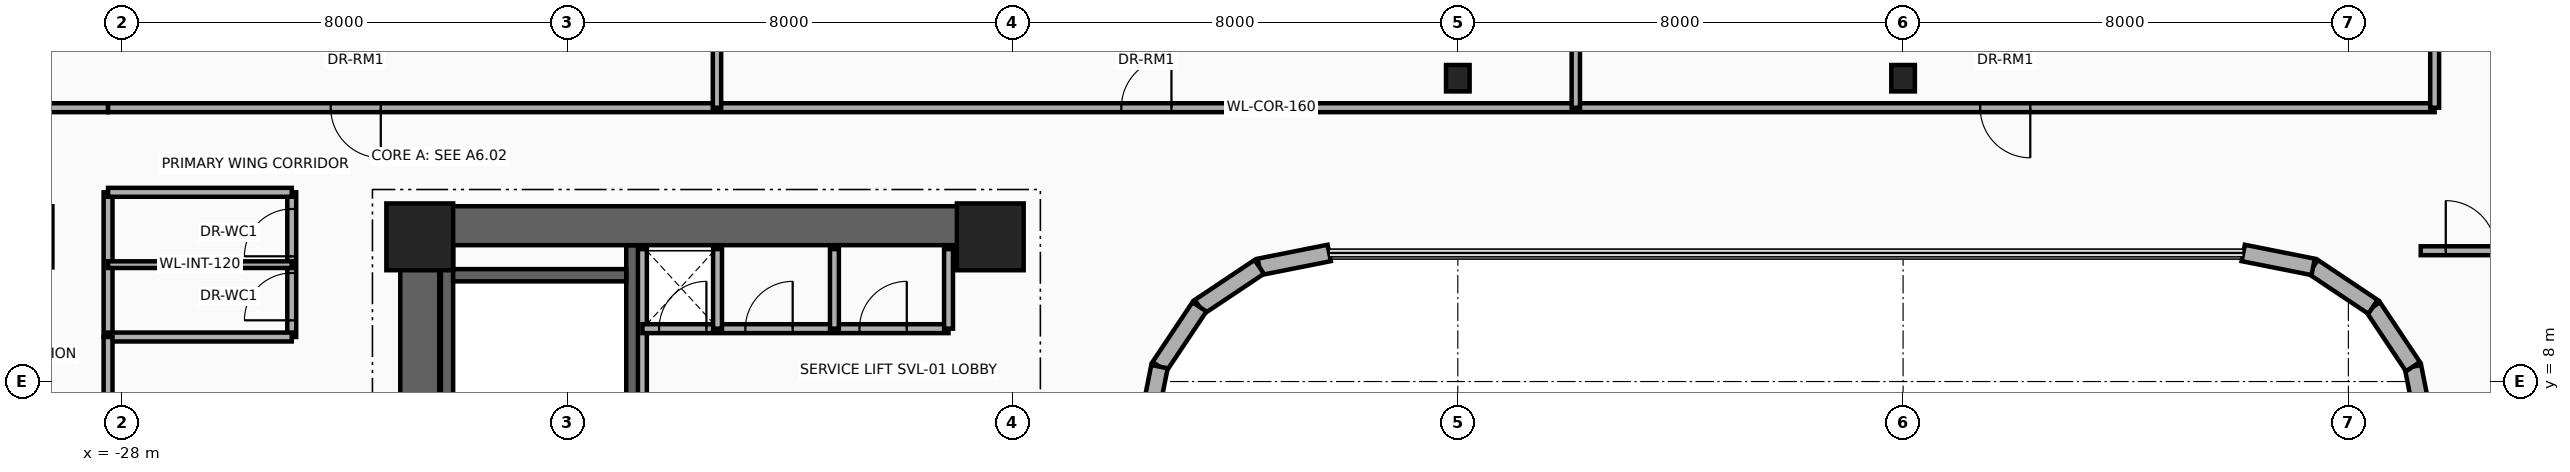
"""IFC4 building model, lengths in metres.
Left out: names, types, materials, properties, quantities, classifications, styles, units other than length and angle.
Written with IfcOpenShell. Run it as: python <this file> out.ifc"""

import sys

from ifc_helpers import new_model, si_unit, direction, frame, frame_2d, origin, origin_2d, place, context, subcontext, project, spatial, rectangle, i_section, extrude, source, transform, mapped, element, fill, save


model = new_model("IFC4")
c1 = context("Model", 3, precision=1e-05, world=origin(), true_north=direction((0.0, 1.0)))
c2 = subcontext(c1, "Body", "Model", "MODEL_VIEW")
j1 = project(units=[si_unit("LENGTHUNIT", "METRE"), si_unit("PLANEANGLEUNIT", "RADIAN")], contexts=[c1])
p1 = place(None, origin())
s1 = spatial("IfcSite", under=j1, at=p1, CompositionType="ELEMENT")
p2 = place(p1, origin())
s2 = spatial("IfcBuilding", under=s1, at=p2, CompositionType="ELEMENT")
p3 = place(p2, frame((0.0, 0.0, 146.4)))
s3 = spatial("IfcBuildingStorey", under=s2, at=p3, CompositionType="ELEMENT", Elevation=146.4)
for number, where, z_axis, x_axis in (
    (1, (-22.16, 1.78, 0.0), (0.0, 0.0, 1.0), (0.0, 1.0, 0.0)),
    (2, (-18.83, 1.78, 0.0), (0.0, 0.0, 1.0), (0.0, 1.0, 0.0)),
):
    element("IfcWall", number, at=place(p3, frame(where, z_axis=z_axis, x_axis=x_axis)), inside=s3, PredefinedType="SHEAR", context=c2, shape_type="SweptSolid", body=[
        extrude(rectangle(XDim=8.67, YDim=0.22, at=frame_2d((4.335, 0.0))), origin(), (0.0, 0.0, 1.0), 3.46),
    ])
p4 = place(p3, frame((-22.05, 9.91, 0.0), z_axis=(0.0, 0.0, 1.0), x_axis=(1.0, 0.0, 0.0)))
e3 = element("IfcWall", 3, at=p4, inside=s3, PredefinedType="SHEAR", context=c2, shape_type="SweptSolid", body=[
    extrude(rectangle(XDim=3.11, YDim=0.22, at=frame_2d((1.555, 0.0))), origin(), (0.0, 0.0, 1.0), 3.46),
])
p5 = place(p3, frame((-22.65, -11.15, 0.0), z_axis=(0.0, 0.0, 1.0), x_axis=(0.0, 1.0, 0.0)))
e4 = element("IfcWall", 4, at=p5, inside=s3, PredefinedType="SHEAR", context=c2, shape_type="SweptSolid", body=[
    extrude(rectangle(XDim=22.3, YDim=0.7, at=frame_2d((11.15, 0.0))), origin(), (0.0, 0.0, 1.0), 3.46),
])
p6 = place(p3, frame((-22.65, 10.8, 0.0), z_axis=(0.0, 0.0, 1.0), x_axis=(1.0, 0.0, 0.0)))
e5 = element("IfcWall", 5, at=p6, inside=s3, PredefinedType="SHEAR", context=c2, shape_type="SweptSolid", body=[
    extrude(rectangle(XDim=10.25, YDim=0.7, at=frame_2d((5.125, 0.0))), origin(), (0.0, 0.0, 1.0), 3.46),
])
m1 = source(origin(), c2, "Body", "SweptSolid", [
    extrude(rectangle(XDim=1.2, YDim=1.2, at=origin_2d()), origin(), (0.0, 0.0, 1.0), 3.7),
])
for number, where, z_axis, x_axis in (
    (6, (-22.65, 10.6, 0.0), (0.0, 0.0, 1.0), (1.0, 0.0, 0.0)),
    (7, (-12.4, 10.6, 0.0), (0.0, 0.0, 1.0), (1.0, 0.0, 0.0)),
):
    element("IfcColumn", number, at=place(p3, frame(where, z_axis=z_axis, x_axis=x_axis)), inside=s3, PredefinedType="COLUMN", context=c2, shape_type="MappedRepresentation", body=[
        mapped(m1, transform((0.0, 0.0, 0.0), x_axis=(1.0, 0.0, 0.0), y_axis=(0.0, 1.0, 0.0), z_axis=(0.0, 0.0, 1.0), scale=1.0)),
    ])
m2 = source(origin(), c2, "Body", "SweptSolid", [
    extrude(i_section(OverallWidth=0.424, OverallDepth=0.474, WebThickness=0.048, FlangeThickness=0.077, at=origin_2d()), origin(), (0.0, 0.0, 1.0), 3.7),
])
for number, where, z_axis, x_axis in (
    (8, (-4.0, 13.45, 0.0), (0.0, 0.0, 1.0), (1.0, 0.0, 0.0)),
    (9, (4.0, 13.45, 0.0), (0.0, 0.0, 1.0), (1.0, 0.0, 0.0)),
):
    element("IfcColumn", number, at=place(p3, frame(where, z_axis=z_axis, x_axis=x_axis)), inside=s3, PredefinedType="COLUMN", context=c2, shape_type="MappedRepresentation", body=[
        mapped(m2, transform((0.0, 0.0, 0.0), x_axis=(1.0, 0.0, 0.0), y_axis=(0.0, 1.0, 0.0), z_axis=(0.0, 0.0, 1.0), scale=1.0)),
    ])
p7 = place(p3, frame((13.41, 7.011, 0.0), z_axis=(0.0, 0.0, 1.0), x_axis=(-0.195090163074, 0.980785312019, 0.0)))
e10 = element("IfcWall", 10, at=p7, inside=s3, PredefinedType="SOLIDWALL", context=c2, shape_type="SweptSolid", body=[
    extrude(rectangle(XDim=1.281, YDim=0.3, at=frame_2d((0.641, 0.0))), origin(), (0.0, 0.0, 1.0), 3.46),
])
for number, where, z_axis, x_axis in (
    (11, (13.16, 8.268, 0.0), (0.0, 0.0, 1.0), (-0.556, 0.831, 0.0)),
    (12, (12.442, 9.342, 0.0), (0.0, 0.0, 1.0), (-0.831, 0.556, 0.0)),
):
    element("IfcWall", number, at=place(p3, frame(where, z_axis=z_axis, x_axis=x_axis)), inside=s3, PredefinedType="SOLIDWALL", context=c2, shape_type="SweptSolid", body=[
        extrude(rectangle(XDim=1.292, YDim=0.3, at=frame_2d((0.646, 0.0))), origin(), (0.0, 0.0, 1.0), 3.46),
    ])
for number, where, z_axis, x_axis in (
    (13, (11.367, 10.06, 0.0), (0.0, 0.0, 1.0), (-0.981, 0.195, 0.0)),
    (14, (-6.311, 10.31, 0.0), (0.0, 0.0, 1.0), (-0.981, -0.195, 0.0)),
):
    element("IfcWall", number, at=place(p3, frame(where, z_axis=z_axis, x_axis=x_axis)), inside=s3, PredefinedType="SOLIDWALL", context=c2, shape_type="SweptSolid", body=[
        extrude(rectangle(XDim=1.281, YDim=0.3, at=frame_2d((0.641, 0.0))), origin(), (0.0, 0.0, 1.0), 3.46),
    ])
p8 = place(p3, frame((-7.567, 10.06, 0.0), z_axis=(0.0, 0.0, 1.0), x_axis=(-0.831497739511, -0.555528135371, 0.0)))
e15 = element("IfcWall", 15, at=p8, inside=s3, PredefinedType="SOLIDWALL", context=c2, shape_type="SweptSolid", body=[
    extrude(rectangle(XDim=1.292, YDim=0.3, at=frame_2d((0.646, 0.0))), origin(), (0.0, 0.0, 1.0), 3.46),
])
p9 = place(p3, frame((-8.642, 9.342, 0.0), z_axis=(0.0, 0.0, 1.0), x_axis=(-0.555615398575, -0.831439431869, 0.0)))
e16 = element("IfcWall", 16, at=p9, inside=s3, PredefinedType="SOLIDWALL", context=c2, shape_type="SweptSolid", body=[
    extrude(rectangle(XDim=1.292, YDim=0.3, at=frame_2d((0.646, 0.0))), origin(), (0.0, 0.0, 1.0), 3.46),
])
p10 = place(p3, frame((-9.36, 8.268, 0.0), z_axis=(0.0, 0.0, 1.0), x_axis=(-0.195090163074, -0.980785312019, 0.0)))
e17 = element("IfcWall", 17, at=p10, inside=s3, PredefinedType="SOLIDWALL", context=c2, shape_type="SweptSolid", body=[
    extrude(rectangle(XDim=1.281, YDim=0.3, at=frame_2d((0.641, 0.0))), origin(), (0.0, 0.0, 1.0), 3.46),
])
p11 = place(p3, frame((-18.65, 7.45, 0.0), z_axis=(0.0, 0.0, 1.0), x_axis=(0.0, 1.0, 0.0)))
e18 = element("IfcWall", 18, at=p11, inside=s3, PredefinedType="PARTITIONING", context=c2, shape_type="SweptSolid", body=[
    extrude(rectangle(XDim=2.93, YDim=0.16, at=frame_2d((1.465, 0.0))), origin(), (0.0, 0.0, 1.0), 3.46),
])
p12 = place(p3, frame((-18.65, 8.95, 0.0), z_axis=(0.0, 0.0, 1.0), x_axis=(1.0, 0.0, 0.0)))
e19 = element("IfcWall", 19, at=p12, inside=s3, PredefinedType="PARTITIONING", context=c2, shape_type="SweptSolid", body=[
    extrude(rectangle(XDim=5.5, YDim=0.16, at=frame_2d((2.75, 0.0))), origin(), (0.0, 0.0, 1.0), 3.46),
])
p13 = place(p12, frame((0.3, 0.0, 0.0)))
e20 = element("IfcOpeningElement", 20, at=p13, cuts=e19, PredefinedType="OPENING", context=c2, shape_type="SweptSolid", body=[
    extrude(rectangle(XDim=0.85, YDim=2.05, at=frame_2d((0.425, 1.025))), frame((0.0, 0.095, 0.0), z_axis=(0.0, -1.0, 0.0), x_axis=(1.0, 0.0, 0.0)), (0.0, 0.0, 1.0), 0.19),
])
p14 = place(p12, frame((1.85, 0.0, 0.0)))
e21 = element("IfcOpeningElement", 21, at=p14, cuts=e19, PredefinedType="OPENING", context=c2, shape_type="SweptSolid", body=[
    extrude(rectangle(XDim=0.85, YDim=2.05, at=frame_2d((0.425, 1.025))), frame((0.0, 0.095, 0.0), z_axis=(0.0, -1.0, 0.0), x_axis=(1.0, 0.0, 0.0)), (0.0, 0.0, 1.0), 0.19),
])
p15 = place(p12, frame((3.9, 0.0, 0.0)))
e22 = element("IfcOpeningElement", 22, at=p15, cuts=e19, PredefinedType="OPENING", context=c2, shape_type="SweptSolid", body=[
    extrude(rectangle(XDim=0.85, YDim=2.05, at=frame_2d((0.425, 1.025))), frame((0.0, 0.095, 0.0), z_axis=(0.0, -1.0, 0.0), x_axis=(1.0, 0.0, 0.0)), (0.0, 0.0, 1.0), 0.19),
])
for number, where, z_axis, x_axis in (
    (23, (-13.15, 8.95, 0.0), (0.0, 0.0, 1.0), (0.0, 1.0, 0.0)),
    (24, (-17.3, 8.95, 0.0), (0.0, 0.0, 1.0), (0.0, 1.0, 0.0)),
    (25, (-15.2, 8.95, 0.0), (0.0, 0.0, 1.0), (0.0, 1.0, 0.0)),
):
    element("IfcWall", number, at=place(p3, frame(where, z_axis=z_axis, x_axis=x_axis)), inside=s3, PredefinedType="PARTITIONING", context=c2, shape_type="SweptSolid", body=[
        extrude(rectangle(XDim=1.43, YDim=0.16, at=frame_2d((0.715, 0.0))), origin(), (0.0, 0.0, 1.0), 3.46),
    ])
p16 = place(p3, frame((-28.25, 8.8, 0.0), z_axis=(0.0, 0.0, 1.0), x_axis=(0.0, 1.0, 0.0)))
e26 = element("IfcWall", 26, at=p16, inside=s3, PredefinedType="PARTITIONING", context=c2, shape_type="SweptSolid", body=[
    extrude(rectangle(XDim=2.6, YDim=0.16, at=frame_2d((1.3, 0.0))), origin(), (0.0, 0.0, 1.0), 2.666),
])
p17 = place(p3, frame((-24.95, 8.8, 0.0), z_axis=(0.0, 0.0, 1.0), x_axis=(0.0, 1.0, 0.0)))
e27 = element("IfcWall", 27, at=p17, inside=s3, PredefinedType="PARTITIONING", context=c2, shape_type="SweptSolid", body=[
    extrude(rectangle(XDim=2.6, YDim=0.16, at=frame_2d((1.3, 0.0))), origin(), (0.0, 0.0, 1.0), 2.666),
])
p18 = place(p17, frame((0.3, 0.0, 0.0)))
e28 = element("IfcOpeningElement", 28, at=p18, cuts=e27, PredefinedType="OPENING", context=c2, shape_type="SweptSolid", body=[
    extrude(rectangle(XDim=0.85, YDim=2.1, at=frame_2d((0.425, 1.05))), frame((0.0, 0.095, 0.0), z_axis=(0.0, -1.0, 0.0), x_axis=(1.0, 0.0, 0.0)), (0.0, 0.0, 1.0), 0.19),
])
p19 = place(p17, frame((1.45, 0.0, 0.0)))
e29 = element("IfcOpeningElement", 29, at=p19, cuts=e27, PredefinedType="OPENING", context=c2, shape_type="SweptSolid", body=[
    extrude(rectangle(XDim=0.85, YDim=2.1, at=frame_2d((0.425, 1.05))), frame((0.0, 0.095, 0.0), z_axis=(0.0, -1.0, 0.0), x_axis=(1.0, 0.0, 0.0)), (0.0, 0.0, 1.0), 0.19),
])
for number, where, z_axis, x_axis in (
    (30, (-28.25, 8.8, 0.0), (0.0, 0.0, 1.0), (1.0, 0.0, 0.0)),
    (31, (-28.25, 11.4, 0.0), (0.0, 0.0, 1.0), (1.0, 0.0, 0.0)),
):
    element("IfcWall", number, at=place(p3, frame(where, z_axis=z_axis, x_axis=x_axis)), inside=s3, PredefinedType="PARTITIONING", context=c2, shape_type="SweptSolid", body=[
        extrude(rectangle(XDim=3.3, YDim=0.16, at=frame_2d((1.65, 0.0))), origin(), (0.0, 0.0, 1.0), 3.46),
    ])
p20 = place(p3, frame((-28.25, 10.1, 0.0), z_axis=(0.0, 0.0, 1.0), x_axis=(1.0, 0.0, 0.0)))
e32 = element("IfcWall", 32, at=p20, inside=s3, PredefinedType="PARTITIONING", context=c2, shape_type="SweptSolid", body=[
    extrude(rectangle(XDim=3.3, YDim=0.12, at=frame_2d((1.65, 0.0))), origin(), (0.0, 0.0, 1.0), 3.46),
])
p21 = place(p3, frame((-28.25, 5.2, 0.0), z_axis=(0.0, 0.0, 1.0), x_axis=(0.0, 1.0, 0.0)))
e33 = element("IfcWall", 33, at=p21, inside=s3, PredefinedType="PARTITIONING", context=c2, shape_type="SweptSolid", body=[
    extrude(rectangle(XDim=3.6, YDim=0.16, at=frame_2d((1.8, 0.0))), origin(), (0.0, 0.0, 1.0), 2.988),
])
p22 = place(p3, frame((-30.89, 12.92, 0.0), z_axis=(0.0, 0.0, 1.0), x_axis=(1.0, 0.0, 0.0)))
e34 = element("IfcWall", 34, at=p22, inside=s3, PredefinedType="PARTITIONING", context=c2, shape_type="SweptSolid", body=[
    extrude(rectangle(XDim=2.64, YDim=0.16, at=frame_2d((1.32, 0.0))), origin(), (0.0, 0.0, 1.0), 2.896),
])
p23 = place(p3, frame((-28.25, 12.92, 0.0), z_axis=(0.0, 0.0, 1.0), x_axis=(1.0, 0.0, 0.0)))
e35 = element("IfcWall", 35, at=p23, inside=s3, PredefinedType="PARTITIONING", context=c2, shape_type="SweptSolid", body=[
    extrude(rectangle(XDim=41.8, YDim=0.16, at=frame_2d((20.9, 0.0))), origin(), (0.0, 0.0, 1.0), 2.666),
])
p24 = place(p23, frame((4.0, 0.0, 0.0)))
e36 = element("IfcOpeningElement", 36, at=p24, cuts=e35, PredefinedType="OPENING", context=c2, shape_type="SweptSolid", body=[
    extrude(rectangle(XDim=0.9, YDim=2.1, at=frame_2d((0.45, 1.05))), frame((0.0, 0.095, 0.0), z_axis=(0.0, -1.0, 0.0), x_axis=(1.0, 0.0, 0.0)), (0.0, 0.0, 1.0), 0.19),
])
p25 = place(p23, frame((18.205, 0.0, 0.0)))
e37 = element("IfcOpeningElement", 37, at=p25, cuts=e35, PredefinedType="OPENING", context=c2, shape_type="SweptSolid", body=[
    extrude(rectangle(XDim=0.9, YDim=2.1, at=frame_2d((0.45, 1.05))), frame((0.0, 0.095, 0.0), z_axis=(0.0, -1.0, 0.0), x_axis=(1.0, 0.0, 0.0)), (0.0, 0.0, 1.0), 0.19),
])
p26 = place(p23, frame((33.635, 0.0, 0.0)))
e38 = element("IfcOpeningElement", 38, at=p26, cuts=e35, PredefinedType="OPENING", context=c2, shape_type="SweptSolid", body=[
    extrude(rectangle(XDim=0.9, YDim=2.1, at=frame_2d((0.45, 1.05))), frame((0.0, 0.095, 0.0), z_axis=(0.0, -1.0, 0.0), x_axis=(1.0, 0.0, 0.0)), (0.0, 0.0, 1.0), 0.19),
])
p27 = place(p3, frame((13.55, 12.92, 0.0), z_axis=(0.0, 0.0, 1.0), x_axis=(0.0, 1.0, 0.0)))
e39 = element("IfcWall", 39, at=p27, inside=s3, PredefinedType="PARTITIONING", context=c2, shape_type="SweptSolid", body=[
    extrude(rectangle(XDim=5.857, YDim=0.16, at=frame_2d((2.928, 0.0))), origin(), (0.0, 0.0, 1.0), 2.666),
])
p28 = place(p3, frame((-17.31, 12.92, 0.0), z_axis=(0.0, 0.0, 1.0), x_axis=(0.0, 1.0, 0.0)))
e40 = element("IfcWall", 40, at=p28, inside=s3, PredefinedType="PARTITIONING", context=c2, shape_type="SweptSolid", body=[
    extrude(rectangle(XDim=6.933, YDim=0.15, at=frame_2d((3.467, 0.0))), origin(), (0.0, 0.0, 1.0), 2.666),
])
p29 = place(p3, frame((-1.88, 12.92, 0.0), z_axis=(0.0, 0.0, 1.0), x_axis=(0.0, 1.0, 0.0)))
e41 = element("IfcWall", 41, at=p29, inside=s3, PredefinedType="PARTITIONING", context=c2, shape_type="SweptSolid", body=[
    extrude(rectangle(XDim=7.055, YDim=0.15, at=frame_2d((3.528, 0.0))), origin(), (0.0, 0.0, 1.0), 2.666),
])
p30 = place(p3, frame((13.3, 10.35, 0.0), z_axis=(0.0, 0.0, 1.0), x_axis=(1.0, 0.0, 0.0)))
e42 = element("IfcWall", 42, at=p30, inside=s3, PredefinedType="PARTITIONING", context=c2, shape_type="SweptSolid", body=[
    extrude(rectangle(XDim=2.1, YDim=0.16, at=frame_2d((1.05, 0.0))), origin(), (0.0, 0.0, 1.0), 2.666),
])
p31 = place(p30, frame((0.45, 0.0, 0.0)))
e43 = element("IfcOpeningElement", 43, at=p31, cuts=e42, PredefinedType="OPENING", context=c2, shape_type="SweptSolid", body=[
    extrude(rectangle(XDim=0.9, YDim=2.1, at=frame_2d((0.45, 1.05))), frame((0.0, 0.095, 0.0), z_axis=(0.0, -1.0, 0.0), x_axis=(1.0, 0.0, 0.0)), (0.0, 0.0, 1.0), 0.19),
])
p32 = place(p13, origin())
e44 = element("IfcDoor", 44, at=p32, inside=s3, OperationType="SINGLE_SWING_LEFT", PredefinedType="DOOR", context=c2, shape_type="SweptSolid", body=[
    extrude(rectangle(XDim=0.85, YDim=2.05, at=frame_2d((0.425, 1.025))), frame((0.0, 0.025, 0.0), z_axis=(0.0, -1.0, 0.0), x_axis=(1.0, 0.0, 0.0)), (0.0, 0.0, 1.0), 0.05),
])
fill(e20, e44)
p33 = place(p14, origin())
e45 = element("IfcDoor", 45, at=p33, inside=s3, OperationType="SINGLE_SWING_RIGHT", PredefinedType="DOOR", context=c2, shape_type="SweptSolid", body=[
    extrude(rectangle(XDim=0.85, YDim=2.05, at=frame_2d((0.425, 1.025))), frame((0.0, 0.025, 0.0), z_axis=(0.0, -1.0, 0.0), x_axis=(1.0, 0.0, 0.0)), (0.0, 0.0, 1.0), 0.05),
])
fill(e21, e45)
p34 = place(p15, origin())
e46 = element("IfcDoor", 46, at=p34, inside=s3, OperationType="SINGLE_SWING_LEFT", PredefinedType="DOOR", context=c2, shape_type="SweptSolid", body=[
    extrude(rectangle(XDim=0.85, YDim=2.05, at=frame_2d((0.425, 1.025))), frame((0.0, 0.025, 0.0), z_axis=(0.0, -1.0, 0.0), x_axis=(1.0, 0.0, 0.0)), (0.0, 0.0, 1.0), 0.05),
])
fill(e22, e46)
p35 = place(p18, origin())
e47 = element("IfcDoor", 47, at=p35, inside=s3, OperationType="SINGLE_SWING_LEFT", PredefinedType="DOOR", context=c2, shape_type="SweptSolid", body=[
    extrude(rectangle(XDim=0.85, YDim=2.1, at=frame_2d((0.425, 1.05))), frame((0.0, 0.025, 0.0), z_axis=(0.0, -1.0, 0.0), x_axis=(1.0, 0.0, 0.0)), (0.0, 0.0, 1.0), 0.05),
])
fill(e28, e47)
p36 = place(p19, origin())
e48 = element("IfcDoor", 48, at=p36, inside=s3, OperationType="SINGLE_SWING_RIGHT", PredefinedType="DOOR", context=c2, shape_type="SweptSolid", body=[
    extrude(rectangle(XDim=0.85, YDim=2.1, at=frame_2d((0.425, 1.05))), frame((0.0, 0.025, 0.0), z_axis=(0.0, -1.0, 0.0), x_axis=(1.0, 0.0, 0.0)), (0.0, 0.0, 1.0), 0.05),
])
fill(e29, e48)
p37 = place(p24, frame((0.9, 0.0, 0.0), z_axis=(0.0, 0.0, 1.0), x_axis=(-1.0, 0.0, 0.0)))
e49 = element("IfcDoor", 49, at=p37, inside=s3, OperationType="SINGLE_SWING_LEFT", PredefinedType="DOOR", context=c2, shape_type="SweptSolid", body=[
    extrude(rectangle(XDim=0.9, YDim=2.1, at=frame_2d((0.45, 1.05))), frame((0.0, 0.025, 0.0), z_axis=(0.0, -1.0, 0.0), x_axis=(1.0, 0.0, 0.0)), (0.0, 0.0, 1.0), 0.05),
])
fill(e36, e49)
p38 = place(p25, origin())
e50 = element("IfcDoor", 50, at=p38, inside=s3, OperationType="SINGLE_SWING_RIGHT", PredefinedType="DOOR", context=c2, shape_type="SweptSolid", body=[
    extrude(rectangle(XDim=0.9, YDim=2.1, at=frame_2d((0.45, 1.05))), frame((0.0, 0.025, 0.0), z_axis=(0.0, -1.0, 0.0), x_axis=(1.0, 0.0, 0.0)), (0.0, 0.0, 1.0), 0.05),
])
fill(e37, e50)
p39 = place(p26, frame((0.9, 0.0, 0.0), z_axis=(0.0, 0.0, 1.0), x_axis=(-1.0, 0.0, 0.0)))
e51 = element("IfcDoor", 51, at=p39, inside=s3, OperationType="SINGLE_SWING_LEFT", PredefinedType="DOOR", context=c2, shape_type="SweptSolid", body=[
    extrude(rectangle(XDim=0.9, YDim=2.1, at=frame_2d((0.45, 1.05))), frame((0.0, 0.025, 0.0), z_axis=(0.0, -1.0, 0.0), x_axis=(1.0, 0.0, 0.0)), (0.0, 0.0, 1.0), 0.05),
])
fill(e38, e51)
p40 = place(p31, origin())
e52 = element("IfcDoor", 52, at=p40, inside=s3, OperationType="SINGLE_SWING_LEFT", PredefinedType="DOOR", context=c2, shape_type="SweptSolid", body=[
    extrude(rectangle(XDim=0.9, YDim=2.1, at=frame_2d((0.45, 1.05))), frame((0.0, 0.025, 0.0), z_axis=(0.0, -1.0, 0.0), x_axis=(1.0, 0.0, 0.0)), (0.0, 0.0, 1.0), 0.05),
])
fill(e43, e52)
save(model, sys.argv[1])
